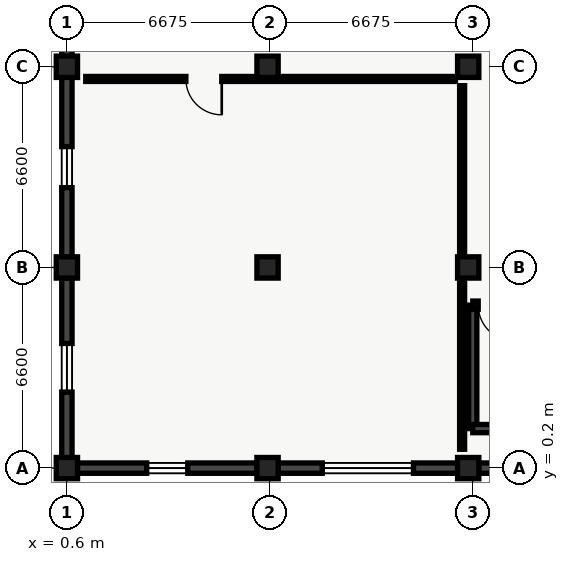
"""IFC4 building model, lengths in metres.
Left out: names, types, materials, properties, quantities, classifications, styles, units other than length and angle.
Written with IfcOpenShell. Run it as: python <this file> out.ifc"""

import sys

from ifc_helpers import new_model, si_unit, direction, frame, frame_2d, origin, origin_2d, place, context, subcontext, project, spatial, rectangle, extrude, element, fill, save


model = new_model("IFC4")
c1 = context("Model", 3, precision=1e-05, world=origin(), true_north=direction((0.0, 1.0)))
c2 = subcontext(c1, "Body", "Model", "MODEL_VIEW")
j1 = project(units=[si_unit("LENGTHUNIT", "METRE"), si_unit("PLANEANGLEUNIT", "RADIAN")], contexts=[c1])
p1 = place(None, origin())
s1 = spatial("IfcSite", under=j1, at=p1, CompositionType="ELEMENT")
p2 = place(p1, origin())
s2 = spatial("IfcBuilding", under=s1, at=p2, CompositionType="ELEMENT")
p3 = place(p2, origin())
s3 = spatial("IfcBuildingStorey", under=s2, at=p3, CompositionType="ELEMENT", Elevation=0.0)
for number, where, z_axis, x_axis in (
    (1, (0.6, 0.2, 0.0), (0.0, 0.0, 1.0), (1.0, 0.0, 0.0)),
    (2, (0.6, 6.8, 0.0), (0.0, 0.0, 1.0), (1.0, 0.0, 0.0)),
    (3, (0.6, 13.4, 0.0), (0.0, 0.0, 1.0), (1.0, 0.0, 0.0)),
    (4, (7.2, 0.2, 0.0), (0.0, 0.0, 1.0), (1.0, 0.0, 0.0)),
    (5, (7.2, 6.8, 0.0), (0.0, 0.0, 1.0), (1.0, 0.0, 0.0)),
    (6, (7.2, 13.4, 0.0), (0.0, 0.0, 1.0), (1.0, 0.0, 0.0)),
    (7, (13.8, 0.2, 0.0), (0.0, 0.0, 1.0), (1.0, 0.0, 0.0)),
    (8, (13.8, 6.8, 0.0), (0.0, 0.0, 1.0), (1.0, 0.0, 0.0)),
    (9, (13.8, 13.4, 0.0), (0.0, 0.0, 1.0), (1.0, 0.0, 0.0)),
):
    element("IfcColumn", number, at=place(p3, frame(where, z_axis=z_axis, x_axis=x_axis)), inside=s3, PredefinedType="COLUMN", context=c2, shape_type="SweptSolid", body=[
        extrude(rectangle(XDim=0.7, YDim=0.7, at=origin_2d()), origin(), (0.0, 0.0, 1.0), 4.88),
    ])
p4 = place(p3, frame((0.6, 0.545, 0.0), z_axis=(0.0, 0.0, 1.0), x_axis=(0.0, 1.0, 0.0)))
e10 = element("IfcWall", 10, at=p4, inside=s3, PredefinedType="SOLIDWALL", context=c2, shape_type="SweptSolid", body=[
    extrude(rectangle(XDim=5.91, YDim=0.34, at=frame_2d((2.955, 0.0))), origin(), (0.0, 0.0, 1.0), 4.415),
])
p5 = place(p4, frame((2.155, 0.0, 0.95)))
e11 = element("IfcOpeningElement", 11, at=p5, cuts=e10, PredefinedType="OPENING", context=c2, shape_type="SweptSolid", body=[
    extrude(rectangle(XDim=1.6, YDim=1.4, at=frame_2d((0.8, 0.7))), frame((0.0, 0.17, 0.0), z_axis=(0.0, -1.0, 0.0), x_axis=(1.0, 0.0, 0.0)), (0.0, 0.0, 1.0), 0.34),
])
p6 = place(p3, frame((0.6, 7.145, 0.0), z_axis=(0.0, 0.0, 1.0), x_axis=(0.0, 1.0, 0.0)))
e12 = element("IfcWall", 12, at=p6, inside=s3, PredefinedType="SOLIDWALL", context=c2, shape_type="SweptSolid", body=[
    extrude(rectangle(XDim=5.91, YDim=0.34, at=frame_2d((2.955, 0.0))), origin(), (0.0, 0.0, 1.0), 4.415),
])
p7 = place(p6, frame((2.28, 0.0, 0.95)))
e13 = element("IfcOpeningElement", 13, at=p7, cuts=e12, PredefinedType="OPENING", context=c2, shape_type="SweptSolid", body=[
    extrude(rectangle(XDim=1.35, YDim=1.8, at=frame_2d((0.675, 0.9))), frame((0.0, 0.17, 0.0), z_axis=(0.0, -1.0, 0.0), x_axis=(1.0, 0.0, 0.0)), (0.0, 0.0, 1.0), 0.34),
])
p8 = place(p3, frame((0.6, 13.745, 0.0), z_axis=(0.0, 0.0, 1.0), x_axis=(0.0, 1.0, 0.0)))
e14 = element("IfcWall", 14, at=p8, inside=s3, PredefinedType="SOLIDWALL", context=c2, shape_type="SweptSolid", body=[
    extrude(rectangle(XDim=5.91, YDim=0.34, at=frame_2d((2.955, 0.0))), origin(), (0.0, 0.0, 1.0), 4.415),
])
p9 = place(p8, frame((1.155, 0.0, 0.0)))
e15 = element("IfcOpeningElement", 15, at=p9, cuts=e14, PredefinedType="OPENING", context=c2, shape_type="SweptSolid", body=[
    extrude(rectangle(XDim=3.6, YDim=2.65, at=frame_2d((1.8, 1.325))), frame((0.0, 0.17, 0.0), z_axis=(0.0, -1.0, 0.0), x_axis=(1.0, 0.0, 0.0)), (0.0, 0.0, 1.0), 0.34),
])
p10 = place(p3, frame((20.055, 0.2, 0.0), z_axis=(0.0, 0.0, 1.0), x_axis=(-1.0, 0.0, 0.0)))
e16 = element("IfcWall", 16, at=p10, inside=s3, PredefinedType="SOLIDWALL", context=c2, shape_type="SweptSolid", body=[
    extrude(rectangle(XDim=5.91, YDim=0.34, at=frame_2d((2.955, 0.0))), origin(), (0.0, 0.0, 1.0), 4.415),
])
p11 = place(p3, frame((13.455, 0.2, 0.0), z_axis=(0.0, 0.0, 1.0), x_axis=(-1.0, 0.0, 0.0)))
e17 = element("IfcWall", 17, at=p11, inside=s3, PredefinedType="SOLIDWALL", context=c2, shape_type="SweptSolid", body=[
    extrude(rectangle(XDim=5.91, YDim=0.34, at=frame_2d((2.955, 0.0))), origin(), (0.0, 0.0, 1.0), 4.415),
])
p12 = place(p11, frame((1.455, 0.0, 0.95)))
e18 = element("IfcOpeningElement", 18, at=p12, cuts=e17, PredefinedType="OPENING", context=c2, shape_type="SweptSolid", body=[
    extrude(rectangle(XDim=3.0, YDim=1.65, at=frame_2d((1.5, 0.825))), frame((0.0, 0.17, 0.0), z_axis=(0.0, -1.0, 0.0), x_axis=(1.0, 0.0, 0.0)), (0.0, 0.0, 1.0), 0.34),
])
p13 = place(p3, frame((6.855, 0.2, 0.0), z_axis=(0.0, 0.0, 1.0), x_axis=(-1.0, 0.0, 0.0)))
e19 = element("IfcWall", 19, at=p13, inside=s3, PredefinedType="SOLIDWALL", context=c2, shape_type="SweptSolid", body=[
    extrude(rectangle(XDim=5.91, YDim=0.34, at=frame_2d((2.955, 0.0))), origin(), (0.0, 0.0, 1.0), 4.415),
])
p14 = place(p13, frame((2.28, 0.0, 0.95)))
e20 = element("IfcOpeningElement", 20, at=p14, cuts=e19, PredefinedType="OPENING", context=c2, shape_type="SweptSolid", body=[
    extrude(rectangle(XDim=1.35, YDim=1.8, at=frame_2d((0.675, 0.9))), frame((0.0, 0.17, 0.0), z_axis=(0.0, -1.0, 0.0), x_axis=(1.0, 0.0, 0.0)), (0.0, 0.0, 1.0), 0.34),
])
p15 = place(p3, frame((13.95, 1.5, 0.0), z_axis=(0.0, 0.0, 1.0), x_axis=(0.0, 1.0, 0.0)))
e21 = element("IfcWall", 21, at=p15, inside=s3, PredefinedType="SHEAR", context=c2, shape_type="SweptSolid", body=[
    extrude(rectangle(XDim=4.06, YDim=0.27, at=frame_2d((2.03, 0.0))), origin(), (0.0, 0.0, 1.0), 4.88),
])
p16 = place(p3, frame((13.95, 5.56, 0.0), z_axis=(0.0, 0.0, 1.0), x_axis=(1.0, 0.0, 0.0)))
e22 = element("IfcWall", 22, at=p16, inside=s3, PredefinedType="SHEAR", context=c2, shape_type="SweptSolid", body=[
    extrude(rectangle(XDim=7.47, YDim=0.27, at=frame_2d((3.735, 0.0))), origin(), (0.0, 0.0, 1.0), 4.88),
])
p17 = place(p16, frame((0.18, 0.0, 0.0)))
e23 = element("IfcOpeningElement", 23, at=p17, cuts=e22, PredefinedType="OPENING", context=c2, shape_type="SweptSolid", body=[
    extrude(rectangle(XDim=1.18, YDim=2.15, at=frame_2d((0.59, 1.075))), frame((0.0, 0.135, 0.0), z_axis=(0.0, -1.0, 0.0), x_axis=(1.0, 0.0, 0.0)), (0.0, 0.0, 1.0), 0.27),
])
p18 = place(p3, frame((21.42, 1.5, 0.0), z_axis=(0.0, 0.0, 1.0), x_axis=(-1.0, 0.0, 0.0)))
e24 = element("IfcWall", 24, at=p18, inside=s3, PredefinedType="SHEAR", context=c2, shape_type="SweptSolid", body=[
    extrude(rectangle(XDim=7.47, YDim=0.27, at=frame_2d((3.735, 0.0))), origin(), (0.0, 0.0, 1.0), 4.88),
])
p19 = place(p3, frame((13.6, 0.82, 0.0), z_axis=(0.0, 0.0, 1.0), x_axis=(0.0, 1.0, 0.0)))
e25 = element("IfcWall", 25, at=p19, inside=s3, PredefinedType="PARTITIONING", context=c2, shape_type="SweptSolid", body=[
    extrude(rectangle(XDim=11.96, YDim=0.165, at=frame_2d((5.98, 0.0))), origin(), (0.0, 0.0, 1.0), 4.215),
])
p20 = place(p3, frame((13.38, 13.0, 0.0), z_axis=(0.0, 0.0, 1.0), x_axis=(-1.0, 0.0, 0.0)))
e26 = element("IfcWall", 26, at=p20, inside=s3, PredefinedType="PARTITIONING", context=c2, shape_type="SweptSolid", body=[
    extrude(rectangle(XDim=12.16, YDim=0.165, at=frame_2d((6.08, 0.0))), origin(), (0.0, 0.0, 1.0), 4.55),
])
p21 = place(p20, frame((7.686, 0.0, 0.0)))
e27 = element("IfcOpeningElement", 27, at=p21, cuts=e26, PredefinedType="OPENING", context=c2, shape_type="SweptSolid", body=[
    extrude(rectangle(XDim=1.18, YDim=2.14, at=frame_2d((0.59, 1.07))), frame((0.0, 0.083, 0.0), z_axis=(0.0, -1.0, 0.0), x_axis=(1.0, 0.0, 0.0)), (0.0, 0.0, 1.0), 0.165),
])
p22 = place(p5, origin())
e28 = element("IfcWindow", 28, at=p22, inside=s3, PartitioningType="SINGLE_PANEL", PredefinedType="WINDOW", context=c2, shape_type="SweptSolid", body=[
    extrude(rectangle(XDim=1.6, YDim=1.4, at=frame_2d((0.8, 0.7))), frame((0.0, 0.03, 0.0), z_axis=(0.0, -1.0, 0.0), x_axis=(1.0, 0.0, 0.0)), (0.0, 0.0, 1.0), 0.06),
])
fill(e11, e28)
p23 = place(p7, origin())
e29 = element("IfcWindow", 29, at=p23, inside=s3, PartitioningType="SINGLE_PANEL", PredefinedType="WINDOW", context=c2, shape_type="SweptSolid", body=[
    extrude(rectangle(XDim=1.35, YDim=1.8, at=frame_2d((0.675, 0.9))), frame((0.0, 0.03, 0.0), z_axis=(0.0, -1.0, 0.0), x_axis=(1.0, 0.0, 0.0)), (0.0, 0.0, 1.0), 0.06),
])
fill(e13, e29)
p24 = place(p12, origin())
e30 = element("IfcWindow", 30, at=p24, inside=s3, PartitioningType="SINGLE_PANEL", PredefinedType="WINDOW", context=c2, shape_type="SweptSolid", body=[
    extrude(rectangle(XDim=3.0, YDim=1.65, at=frame_2d((1.5, 0.825))), frame((0.0, 0.03, 0.0), z_axis=(0.0, -1.0, 0.0), x_axis=(1.0, 0.0, 0.0)), (0.0, 0.0, 1.0), 0.06),
])
fill(e18, e30)
p25 = place(p14, origin())
e31 = element("IfcWindow", 31, at=p25, inside=s3, PartitioningType="SINGLE_PANEL", PredefinedType="WINDOW", context=c2, shape_type="SweptSolid", body=[
    extrude(rectangle(XDim=1.35, YDim=1.8, at=frame_2d((0.675, 0.9))), frame((0.0, 0.03, 0.0), z_axis=(0.0, -1.0, 0.0), x_axis=(1.0, 0.0, 0.0)), (0.0, 0.0, 1.0), 0.06),
])
fill(e20, e31)
p26 = place(p17, origin())
e32 = element("IfcDoor", 32, at=p26, inside=s3, OperationType="SINGLE_SWING_RIGHT", PredefinedType="DOOR", context=c2, shape_type="SweptSolid", body=[
    extrude(rectangle(XDim=1.18, YDim=2.15, at=frame_2d((0.59, 1.075))), frame((0.0, 0.025, 0.0), z_axis=(0.0, -1.0, 0.0), x_axis=(1.0, 0.0, 0.0)), (0.0, 0.0, 1.0), 0.05),
])
fill(e23, e32)
p27 = place(p21, origin())
e33 = element("IfcDoor", 33, at=p27, inside=s3, OperationType="SINGLE_SWING_LEFT", PredefinedType="DOOR", context=c2, shape_type="SweptSolid", body=[
    extrude(rectangle(XDim=1.18, YDim=2.14, at=frame_2d((0.59, 1.07))), frame((0.0, 0.025, 0.0), z_axis=(0.0, -1.0, 0.0), x_axis=(1.0, 0.0, 0.0)), (0.0, 0.0, 1.0), 0.05),
])
fill(e27, e33)
save(model, sys.argv[1])
